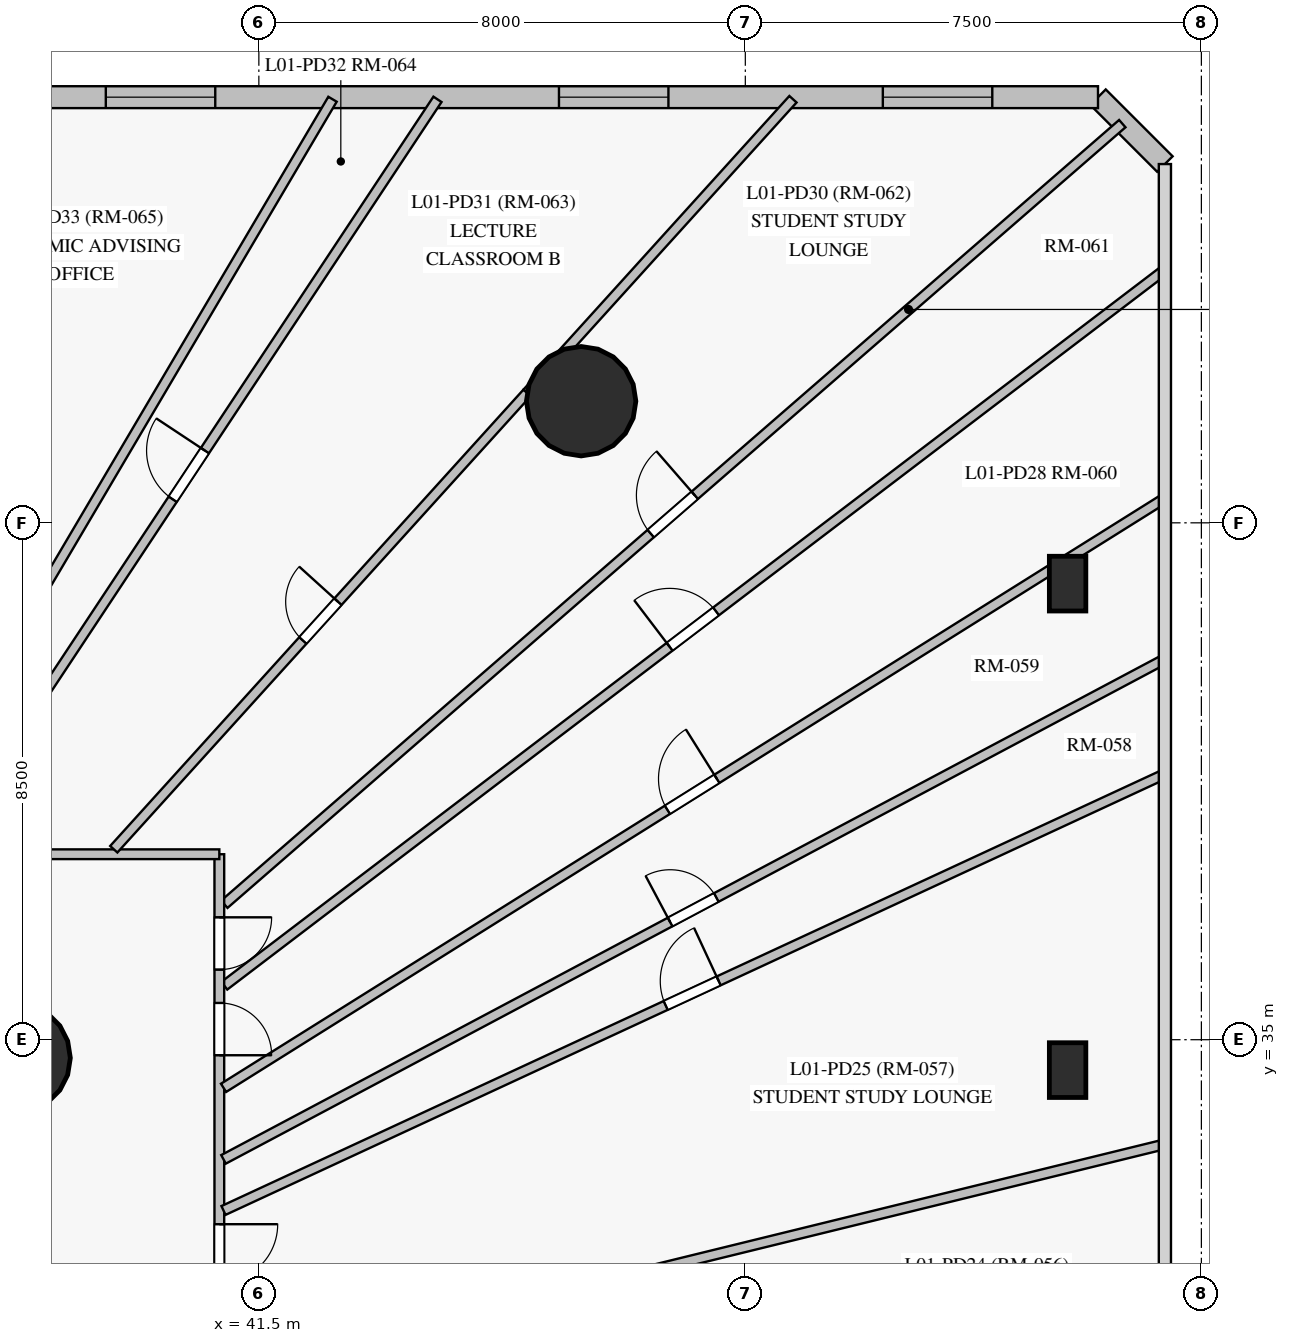
"""IFC4 building model, lengths in metres.
Left out: names, types, materials, properties, quantities, classifications, styles, units other than length and angle.
Written with IfcOpenShell. Run it as: python <this file> out.ifc"""

import sys

from ifc_helpers import new_model, si_unit, direction, frame, frame_2d, origin, origin_with_axes, origin_2d, place, context, subcontext, project, spatial, rectangle, circle, extrude, source, transform, mapped, element, fill, save


model = new_model("IFC4")
c1 = context("Model", 3, precision=1e-05, world=origin(), true_north=direction((0.0, 1.0)))
c2 = subcontext(c1, "Body", "Model", "MODEL_VIEW")
j1 = project(units=[si_unit("LENGTHUNIT", "METRE"), si_unit("PLANEANGLEUNIT", "RADIAN")], contexts=[c1])
p1 = place(None, origin())
s1 = spatial("IfcSite", under=j1, at=p1, CompositionType="ELEMENT")
p2 = place(p1, origin())
s2 = spatial("IfcBuilding", under=s1, at=p2, CompositionType="ELEMENT")
p3 = place(p2, frame((0.0, 0.0, 4.5)))
s3 = spatial("IfcBuildingStorey", under=s2, at=p3, CompositionType="ELEMENT", Elevation=4.5)
m1 = source(origin_with_axes(), c2, "Body", "SweptSolid", [
    extrude(circle(Radius=0.9, at=origin_2d()), origin(), (0.0, 0.0, 1.0), 4.5),
])
for number, where, z_axis, x_axis in (
    (1, (37.5, 34.7, 0.0), (0.0, 0.0, 1.0), (1.0, 0.0, 0.0)),
    (2, (46.8, 45.5, 0.0), (0.0, 0.0, 1.0), (1.0, 0.0, 0.0)),
):
    element("IfcColumn", number, at=place(p3, frame(where, z_axis=z_axis, x_axis=x_axis)), inside=s3, PredefinedType="COLUMN", context=c2, shape_type="MappedRepresentation", body=[
        mapped(m1, transform((0.0, 0.0, 0.0), scale=1.0)),
    ])
m2 = source(origin_with_axes(), c2, "Body", "SweptSolid", [
    extrude(rectangle(XDim=0.6, YDim=0.9, at=origin_2d()), origin(), (0.0, 0.0, 1.0), 4.5),
])
for number, where, z_axis, x_axis in (
    (3, (54.8, 34.5, 0.0), (0.0, 0.0, 1.0), (1.0, 0.0, 0.0)),
    (4, (54.8, 42.5, 0.0), (0.0, 0.0, 1.0), (1.0, 0.0, 0.0)),
):
    element("IfcColumn", number, at=place(p3, frame(where, z_axis=z_axis, x_axis=x_axis)), inside=s3, PredefinedType="PILASTER", context=c2, shape_type="MappedRepresentation", body=[
        mapped(m2, transform((0.0, 0.0, 0.0), scale=1.0)),
    ])
p4 = place(p3, frame((56.4, 49.4, 0.0), z_axis=(0.0, 0.0, 1.0), x_axis=(-0.707028305322, 0.707185248342, 0.0)))
e5 = element("IfcWall", 5, at=p4, inside=s3, PredefinedType="SOLIDWALL", context=c2, shape_type="SweptSolid", body=[
    extrude(rectangle(XDim=1.556, YDim=0.36, at=frame_2d((0.778, 0.0))), origin(), (0.0, 0.0, 1.0), 4.2),
])
p5 = place(p3, frame((55.3, 50.5, 0.0), z_axis=(0.0, 0.0, 1.0), x_axis=(-1.0, 0.0, 0.0)))
e6 = element("IfcWall", 6, at=p5, inside=s3, PredefinedType="SOLIDWALL", context=c2, shape_type="SweptSolid", body=[
    extrude(rectangle(XDim=51.85, YDim=0.36, at=frame_2d((25.925, 0.0))), origin(), (0.0, 0.0, 1.0), 4.2),
])
p6 = place(p5, frame((1.739, 0.0, 0.85)))
e7 = element("IfcOpeningElement", 7, at=p6, cuts=e6, PredefinedType="OPENING", context=c2, shape_type="SweptSolid", body=[
    extrude(rectangle(XDim=1.8, YDim=2.2, at=frame_2d((0.9, 1.1))), frame((0.0, 0.19, 0.0), z_axis=(0.0, -1.0, 0.0), x_axis=(1.0, 0.0, 0.0)), (0.0, 0.0, 1.0), 0.38),
])
p7 = place(p5, frame((7.064, 0.0, 0.85)))
e8 = element("IfcOpeningElement", 8, at=p7, cuts=e6, PredefinedType="OPENING", context=c2, shape_type="SweptSolid", body=[
    extrude(rectangle(XDim=1.8, YDim=2.2, at=frame_2d((0.9, 1.1))), frame((0.0, 0.19, 0.0), z_axis=(0.0, -1.0, 0.0), x_axis=(1.0, 0.0, 0.0)), (0.0, 0.0, 1.0), 0.38),
])
p8 = place(p5, frame((14.517, 0.0, 0.85)))
e9 = element("IfcOpeningElement", 9, at=p8, cuts=e6, PredefinedType="OPENING", context=c2, shape_type="SweptSolid", body=[
    extrude(rectangle(XDim=1.8, YDim=2.2, at=frame_2d((0.9, 1.1))), frame((0.0, 0.19, 0.0), z_axis=(0.0, -1.0, 0.0), x_axis=(1.0, 0.0, 0.0)), (0.0, 0.0, 1.0), 0.38),
])
p9 = place(p5, frame((19.389, 0.0, 0.85)))
e10 = element("IfcOpeningElement", 10, at=p9, cuts=e6, PredefinedType="OPENING", context=c2, shape_type="SweptSolid", body=[
    extrude(rectangle(XDim=1.8, YDim=2.2, at=frame_2d((0.9, 1.1))), frame((0.0, 0.19, 0.0), z_axis=(0.0, -1.0, 0.0), x_axis=(1.0, 0.0, 0.0)), (0.0, 0.0, 1.0), 0.38),
])
p10 = place(p5, frame((23.507, 0.0, 0.85)))
e11 = element("IfcOpeningElement", 11, at=p10, cuts=e6, PredefinedType="OPENING", context=c2, shape_type="SweptSolid", body=[
    extrude(rectangle(XDim=1.8, YDim=2.2, at=frame_2d((0.9, 1.1))), frame((0.0, 0.19, 0.0), z_axis=(0.0, -1.0, 0.0), x_axis=(1.0, 0.0, 0.0)), (0.0, 0.0, 1.0), 0.38),
])
p11 = place(p5, frame((27.282, 0.0, 0.85)))
e12 = element("IfcOpeningElement", 12, at=p11, cuts=e6, PredefinedType="OPENING", context=c2, shape_type="SweptSolid", body=[
    extrude(rectangle(XDim=1.8, YDim=2.2, at=frame_2d((0.9, 1.1))), frame((0.0, 0.19, 0.0), z_axis=(0.0, -1.0, 0.0), x_axis=(1.0, 0.0, 0.0)), (0.0, 0.0, 1.0), 0.38),
])
p12 = place(p5, frame((31.1, 0.0, 0.85)))
e13 = element("IfcOpeningElement", 13, at=p12, cuts=e6, PredefinedType="OPENING", context=c2, shape_type="SweptSolid", body=[
    extrude(rectangle(XDim=1.8, YDim=2.2, at=frame_2d((0.9, 1.1))), frame((0.0, 0.19, 0.0), z_axis=(0.0, -1.0, 0.0), x_axis=(1.0, 0.0, 0.0)), (0.0, 0.0, 1.0), 0.38),
])
p13 = place(p5, frame((35.392, 0.0, 0.85)))
e14 = element("IfcOpeningElement", 14, at=p13, cuts=e6, PredefinedType="OPENING", context=c2, shape_type="SweptSolid", body=[
    extrude(rectangle(XDim=1.8, YDim=2.2, at=frame_2d((0.9, 1.1))), frame((0.0, 0.19, 0.0), z_axis=(0.0, -1.0, 0.0), x_axis=(1.0, 0.0, 0.0)), (0.0, 0.0, 1.0), 0.38),
])
p14 = place(p5, frame((42.797, 0.0, 0.85)))
e15 = element("IfcOpeningElement", 15, at=p14, cuts=e6, PredefinedType="OPENING", context=c2, shape_type="SweptSolid", body=[
    extrude(rectangle(XDim=1.8, YDim=2.2, at=frame_2d((0.9, 1.1))), frame((0.0, 0.19, 0.0), z_axis=(0.0, -1.0, 0.0), x_axis=(1.0, 0.0, 0.0)), (0.0, 0.0, 1.0), 0.38),
])
p15 = place(p5, frame((47.865, 0.0, 0.85)))
e16 = element("IfcOpeningElement", 16, at=p15, cuts=e6, PredefinedType="OPENING", context=c2, shape_type="SweptSolid", body=[
    extrude(rectangle(XDim=1.8, YDim=2.2, at=frame_2d((0.9, 1.1))), frame((0.0, 0.19, 0.0), z_axis=(0.0, -1.0, 0.0), x_axis=(1.0, 0.0, 0.0)), (0.0, 0.0, 1.0), 0.38),
])
p16 = place(p3, frame((40.932, 37.227, 0.0), z_axis=(0.0, 0.0, 1.0), x_axis=(0.754711343855, 0.656057000158, 0.0)))
e17 = element("IfcWall", 17, at=p16, inside=s3, PredefinedType="PARTITIONING", context=c2, shape_type="SweptSolid", body=[
    extrude(rectangle(XDim=19.568, YDim=0.16, at=frame_2d((9.784, 0.0))), origin(), (0.0, 0.0, 1.0), 4.2),
])
p17 = place(p16, frame((9.291, 0.0, 0.0)))
e18 = element("IfcOpeningElement", 18, at=p17, cuts=e17, PredefinedType="OPENING", context=c2, shape_type="SweptSolid", body=[
    extrude(rectangle(XDim=0.96, YDim=2.15, at=frame_2d((0.48, 1.075))), frame((0.0, 0.09, 0.0), z_axis=(0.0, -1.0, 0.0), x_axis=(1.0, 0.0, 0.0)), (0.0, 0.0, 1.0), 0.18),
])
p18 = place(p3, frame((40.932, 35.888, 0.0), z_axis=(0.0, 0.0, 1.0), x_axis=(0.795705622, 0.605683550311, 0.0)))
e19 = element("IfcWall", 19, at=p18, inside=s3, PredefinedType="PARTITIONING", context=c2, shape_type="SweptSolid", body=[
    extrude(rectangle(XDim=19.392, YDim=0.16, at=frame_2d((9.696, 0.0))), origin(), (0.0, 0.0, 1.0), 4.2),
])
p19 = place(p18, frame((9.203, 0.0, 0.0)))
e20 = element("IfcOpeningElement", 20, at=p19, cuts=e19, PredefinedType="OPENING", context=c2, shape_type="SweptSolid", body=[
    extrude(rectangle(XDim=0.96, YDim=2.15, at=frame_2d((0.48, 1.075))), frame((0.0, 0.09, 0.0), z_axis=(0.0, -1.0, 0.0), x_axis=(1.0, 0.0, 0.0)), (0.0, 0.0, 1.0), 0.18),
])
p20 = place(p3, frame((40.85, 38.05, 0.0), z_axis=(0.0, 0.0, 1.0), x_axis=(0.0, -1.0, 0.0)))
e21 = element("IfcWall", 21, at=p20, inside=s3, PredefinedType="PARTITIONING", context=c2, shape_type="SweptSolid", body=[
    extrude(rectangle(XDim=18.508, YDim=0.16, at=frame_2d((9.254, 0.0))), origin(), (0.0, 0.0, 1.0), 3.25),
])
p21 = place(p20, frame((13.28, 0.0, 0.0)))
e22 = element("IfcOpeningElement", 22, at=p21, cuts=e21, PredefinedType="OPENING", context=c2, shape_type="SweptSolid", body=[
    extrude(rectangle(XDim=0.96, YDim=2.15, at=frame_2d((0.48, 1.075))), frame((0.0, 0.09, 0.0), z_axis=(0.0, -1.0, 0.0), x_axis=(1.0, 0.0, 0.0)), (0.0, 0.0, 1.0), 0.18),
])
p22 = place(p20, frame((11.636, 0.0, 0.0)))
e23 = element("IfcOpeningElement", 23, at=p22, cuts=e21, PredefinedType="OPENING", context=c2, shape_type="SweptSolid", body=[
    extrude(rectangle(XDim=0.96, YDim=2.15, at=frame_2d((0.48, 1.075))), frame((0.0, 0.09, 0.0), z_axis=(0.0, -1.0, 0.0), x_axis=(1.0, 0.0, 0.0)), (0.0, 0.0, 1.0), 0.18),
])
p23 = place(p20, frame((8.835, 0.0, 0.0)))
e24 = element("IfcOpeningElement", 24, at=p23, cuts=e21, PredefinedType="OPENING", context=c2, shape_type="SweptSolid", body=[
    extrude(rectangle(XDim=0.96, YDim=2.15, at=frame_2d((0.48, 1.075))), frame((0.0, 0.09, 0.0), z_axis=(0.0, -1.0, 0.0), x_axis=(1.0, 0.0, 0.0)), (0.0, 0.0, 1.0), 0.18),
])
p24 = place(p20, frame((6.084, 0.0, 0.0)))
e25 = element("IfcOpeningElement", 25, at=p24, cuts=e21, PredefinedType="OPENING", context=c2, shape_type="SweptSolid", body=[
    extrude(rectangle(XDim=0.96, YDim=2.15, at=frame_2d((0.48, 1.075))), frame((0.0, 0.09, 0.0), z_axis=(0.0, -1.0, 0.0), x_axis=(1.0, 0.0, 0.0)), (0.0, 0.0, 1.0), 0.18),
])
p25 = place(p20, frame((7.2, 0.0, 0.0)))
e26 = element("IfcOpeningElement", 26, at=p25, cuts=e21, PredefinedType="OPENING", context=c2, shape_type="SweptSolid", body=[
    extrude(rectangle(XDim=0.96, YDim=2.15, at=frame_2d((0.48, 1.075))), frame((0.0, 0.09, 0.0), z_axis=(0.0, -1.0, 0.0), x_axis=(1.0, 0.0, 0.0)), (0.0, 0.0, 1.0), 0.18),
])
p26 = place(p20, frame((2.446, 0.0, 0.0)))
e27 = element("IfcOpeningElement", 27, at=p26, cuts=e21, PredefinedType="OPENING", context=c2, shape_type="SweptSolid", body=[
    extrude(rectangle(XDim=0.86, YDim=2.04, at=frame_2d((0.43, 1.02))), frame((0.0, 0.09, 0.0), z_axis=(0.0, -1.0, 0.0), x_axis=(1.0, 0.0, 0.0)), (0.0, 0.0, 1.0), 0.18),
])
p27 = place(p20, frame((1.037, 0.0, 0.0)))
e28 = element("IfcOpeningElement", 28, at=p27, cuts=e21, PredefinedType="OPENING", context=c2, shape_type="SweptSolid", body=[
    extrude(rectangle(XDim=0.86, YDim=2.04, at=frame_2d((0.43, 1.02))), frame((0.0, 0.09, 0.0), z_axis=(0.0, -1.0, 0.0), x_axis=(1.0, 0.0, 0.0)), (0.0, 0.0, 1.0), 0.18),
])
p28 = place(p3, frame((40.919, 34.208, 0.0), z_axis=(0.0, 0.0, 1.0), x_axis=(0.847469594602, 0.530843937731, 0.0)))
e29 = element("IfcWall", 29, at=p28, inside=s3, PredefinedType="PARTITIONING", context=c2, shape_type="SweptSolid", body=[
    extrude(rectangle(XDim=18.226, YDim=0.16, at=frame_2d((9.113, 0.0))), origin(), (0.0, 0.0, 1.0), 4.2),
])
p29 = place(p28, frame((8.613, 0.0, 0.0)))
e30 = element("IfcOpeningElement", 30, at=p29, cuts=e29, PredefinedType="OPENING", context=c2, shape_type="SweptSolid", body=[
    extrude(rectangle(XDim=0.96, YDim=2.15, at=frame_2d((0.48, 1.075))), frame((0.0, 0.09, 0.0), z_axis=(0.0, -1.0, 0.0), x_axis=(1.0, 0.0, 0.0)), (0.0, 0.0, 1.0), 0.18),
])
p30 = place(p3, frame((40.919, 33.032, 0.0), z_axis=(0.0, 0.0, 1.0), x_axis=(0.883043074969, 0.469291942984, 0.0)))
e31 = element("IfcWall", 31, at=p30, inside=s3, PredefinedType="PARTITIONING", context=c2, shape_type="SweptSolid", body=[
    extrude(rectangle(XDim=17.495, YDim=0.16, at=frame_2d((8.748, 0.0))), origin(), (0.0, 0.0, 1.0), 4.2),
])
p31 = place(p30, frame((8.317, 0.0, 0.0)))
e32 = element("IfcOpeningElement", 32, at=p31, cuts=e31, PredefinedType="OPENING", context=c2, shape_type="SweptSolid", body=[
    extrude(rectangle(XDim=0.86, YDim=2.04, at=frame_2d((0.43, 1.02))), frame((0.0, 0.09, 0.0), z_axis=(0.0, -1.0, 0.0), x_axis=(1.0, 0.0, 0.0)), (0.0, 0.0, 1.0), 0.18),
])
p32 = place(p3, frame((40.918, 32.192, 0.0), z_axis=(0.0, 0.0, 1.0), x_axis=(0.907224152949, 0.420647520265, 0.0)))
e33 = element("IfcWall", 33, at=p32, inside=s3, PredefinedType="PARTITIONING", context=c2, shape_type="SweptSolid", body=[
    extrude(rectangle(XDim=17.031, YDim=0.16, at=frame_2d((8.515, 0.0))), origin(), (0.0, 0.0, 1.0), 4.2),
])
p33 = place(p32, frame((8.015, 0.0, 0.0)))
e34 = element("IfcOpeningElement", 34, at=p33, cuts=e33, PredefinedType="OPENING", context=c2, shape_type="SweptSolid", body=[
    extrude(rectangle(XDim=0.96, YDim=2.15, at=frame_2d((0.48, 1.075))), frame((0.0, 0.09, 0.0), z_axis=(0.0, -1.0, 0.0), x_axis=(1.0, 0.0, 0.0)), (0.0, 0.0, 1.0), 0.18),
])
p34 = place(p3, frame((40.917, 29.484, 0.0), z_axis=(0.0, 0.0, 1.0), x_axis=(0.97121044227, 0.238223166012, 0.0)))
e35 = element("IfcWall", 35, at=p34, inside=s3, PredefinedType="PARTITIONING", context=c2, shape_type="SweptSolid", body=[
    extrude(rectangle(XDim=15.914, YDim=0.16, at=frame_2d((7.957, 0.0))), origin(), (0.0, 0.0, 1.0), 3.7),
])
p35 = place(p3, frame((25.4, 38.05, 0.0), z_axis=(0.0, 0.0, 1.0), x_axis=(1.0, 0.0, 0.0)))
e36 = element("IfcWall", 36, at=p35, inside=s3, PredefinedType="PARTITIONING", context=c2, shape_type="SweptSolid", body=[
    extrude(rectangle(XDim=15.45, YDim=0.16, at=frame_2d((7.725, 0.0))), origin(), (0.0, 0.0, 1.0), 4.2),
])
p36 = place(p35, frame((11.452, 0.0, 0.0)))
e37 = element("IfcOpeningElement", 37, at=p36, cuts=e36, PredefinedType="OPENING", context=c2, shape_type="SweptSolid", body=[
    extrude(rectangle(XDim=0.96, YDim=2.15, at=frame_2d((0.48, 1.075))), frame((0.0, 0.09, 0.0), z_axis=(0.0, -1.0, 0.0), x_axis=(1.0, 0.0, 0.0)), (0.0, 0.0, 1.0), 0.18),
])
p37 = place(p35, frame((7.59, 0.0, 0.0)))
e38 = element("IfcOpeningElement", 38, at=p37, cuts=e36, PredefinedType="OPENING", context=c2, shape_type="SweptSolid", body=[
    extrude(rectangle(XDim=0.96, YDim=2.15, at=frame_2d((0.48, 1.075))), frame((0.0, 0.09, 0.0), z_axis=(0.0, -1.0, 0.0), x_axis=(1.0, 0.0, 0.0)), (0.0, 0.0, 1.0), 0.18),
])
p38 = place(p35, frame((5.573, 0.0, 0.0)))
e39 = element("IfcOpeningElement", 39, at=p38, cuts=e36, PredefinedType="OPENING", context=c2, shape_type="SweptSolid", body=[
    extrude(rectangle(XDim=0.96, YDim=2.15, at=frame_2d((0.48, 1.075))), frame((0.0, 0.09, 0.0), z_axis=(0.0, -1.0, 0.0), x_axis=(1.0, 0.0, 0.0)), (0.0, 0.0, 1.0), 0.18),
])
p39 = place(p35, frame((3.528, 0.0, 0.0)))
e40 = element("IfcOpeningElement", 40, at=p39, cuts=e36, PredefinedType="OPENING", context=c2, shape_type="SweptSolid", body=[
    extrude(rectangle(XDim=0.96, YDim=2.15, at=frame_2d((0.48, 1.075))), frame((0.0, 0.09, 0.0), z_axis=(0.0, -1.0, 0.0), x_axis=(1.0, 0.0, 0.0)), (0.0, 0.0, 1.0), 0.18),
])
p40 = place(p3, frame((36.273, 38.132, 0.0), z_axis=(0.0, 0.0, 1.0), x_axis=(0.552038412562, 0.833818679963, 0.0)))
e41 = element("IfcWall", 41, at=p40, inside=s3, PredefinedType="PARTITIONING", context=c2, shape_type="SweptSolid", body=[
    extrude(rectangle(XDim=14.79, YDim=0.16, at=frame_2d((7.395, 0.0))), origin(), (0.0, 0.0, 1.0), 4.2),
])
p41 = place(p40, frame((6.903, 0.0, 0.0)))
e42 = element("IfcOpeningElement", 42, at=p41, cuts=e41, PredefinedType="OPENING", context=c2, shape_type="SweptSolid", body=[
    extrude(rectangle(XDim=0.96, YDim=2.15, at=frame_2d((0.48, 1.075))), frame((0.0, 0.09, 0.0), z_axis=(0.0, -1.0, 0.0), x_axis=(1.0, 0.0, 0.0)), (0.0, 0.0, 1.0), 0.18),
])
p42 = place(p3, frame((35.426, 38.119, 0.0), z_axis=(0.0, 0.0, 1.0), x_axis=(0.508185874547, 0.861247419103, 0.0)))
e43 = element("IfcWall", 43, at=p42, inside=s3, PredefinedType="PARTITIONING", context=c2, shape_type="SweptSolid", body=[
    extrude(rectangle(XDim=14.336, YDim=0.16, at=frame_2d((7.168, 0.0))), origin(), (0.0, 0.0, 1.0), 4.2),
])
p43 = place(p3, frame((39.114, 38.132, 0.0), z_axis=(0.0, 0.0, 1.0), x_axis=(0.671237186901, 0.741242631613, 0.0)))
e44 = element("IfcWall", 44, at=p43, inside=s3, PredefinedType="PARTITIONING", context=c2, shape_type="SweptSolid", body=[
    extrude(rectangle(XDim=10.124, YDim=0.16, at=frame_2d((5.062, 0.0))), origin(), (0.0, 0.0, 1.0), 4.2),
])
p44 = place(p43, frame((4.632, 0.0, 0.0)))
e45 = element("IfcOpeningElement", 45, at=p44, cuts=e44, PredefinedType="OPENING", context=c2, shape_type="SweptSolid", body=[
    extrude(rectangle(XDim=0.86, YDim=2.04, at=frame_2d((0.43, 1.02))), frame((0.0, 0.09, 0.0), z_axis=(0.0, -1.0, 0.0), x_axis=(1.0, 0.0, 0.0)), (0.0, 0.0, 1.0), 0.18),
])
p45 = place(p3, frame((45.913, 45.64, 0.0), z_axis=(0.0, 0.0, 1.0), x_axis=(0.671236287412, 0.741243446151, 0.0)))
e46 = element("IfcWall", 46, at=p45, inside=s3, PredefinedType="PARTITIONING", context=c2, shape_type="SweptSolid", body=[
    extrude(rectangle(XDim=6.511, YDim=0.16, at=frame_2d((3.255, 0.0))), origin(), (0.0, 0.0, 1.0), 4.2),
])
m3 = source(origin_with_axes(), c2, "Body", "SweptSolid", [
    extrude(rectangle(XDim=1.8, YDim=2.2, at=frame_2d((0.9, 1.1))), frame((0.0, 0.03, 0.0), z_axis=(0.0, -1.0, 0.0), x_axis=(1.0, 0.0, 0.0)), (0.0, 0.0, 1.0), 0.06),
])
p46 = place(p6, origin())
e47 = element("IfcWindow", 47, at=p46, inside=s3, PartitioningType="SINGLE_PANEL", PredefinedType="WINDOW", context=c2, shape_type="MappedRepresentation", body=[
    mapped(m3, transform((0.0, 0.0, 0.0), scale=1.0)),
])
fill(e7, e47)
p47 = place(p7, origin())
e48 = element("IfcWindow", 48, at=p47, inside=s3, PartitioningType="SINGLE_PANEL", PredefinedType="WINDOW", context=c2, shape_type="MappedRepresentation", body=[
    mapped(m3, transform((0.0, 0.0, 0.0), scale=1.0)),
])
fill(e8, e48)
p48 = place(p8, origin())
e49 = element("IfcWindow", 49, at=p48, inside=s3, PartitioningType="SINGLE_PANEL", PredefinedType="WINDOW", context=c2, shape_type="MappedRepresentation", body=[
    mapped(m3, transform((0.0, 0.0, 0.0), scale=1.0)),
])
fill(e9, e49)
m4 = source(origin_with_axes(), c2, "Body", "SweptSolid", [
    extrude(rectangle(XDim=0.96, YDim=2.15, at=frame_2d((0.48, 1.075))), frame((0.0, 0.025, 0.0), z_axis=(0.0, -1.0, 0.0), x_axis=(1.0, 0.0, 0.0)), (0.0, 0.0, 1.0), 0.05),
])
p49 = place(p24, origin())
e50 = element("IfcDoor", 50, at=p49, inside=s3, OperationType="SINGLE_SWING_LEFT", PredefinedType="DOOR", context=c2, shape_type="MappedRepresentation", body=[
    mapped(m4, transform((0.0, 0.0, 0.0), scale=1.0)),
])
fill(e25, e50)
p50 = place(p33, origin())
e51 = element("IfcDoor", 51, at=p50, inside=s3, OperationType="SINGLE_SWING_RIGHT", PredefinedType="DOOR", context=c2, shape_type="MappedRepresentation", body=[
    mapped(m4, transform((0.0, 0.0, 0.0), scale=1.0)),
])
fill(e34, e51)
p51 = place(p29, origin())
e52 = element("IfcDoor", 52, at=p51, inside=s3, OperationType="SINGLE_SWING_RIGHT", PredefinedType="DOOR", context=c2, shape_type="MappedRepresentation", body=[
    mapped(m4, transform((0.0, 0.0, 0.0), scale=1.0)),
])
fill(e30, e52)
p52 = place(p19, origin())
e53 = element("IfcDoor", 53, at=p52, inside=s3, OperationType="SINGLE_SWING_LEFT", PredefinedType="DOOR", context=c2, shape_type="MappedRepresentation", body=[
    mapped(m4, transform((0.0, 0.0, 0.0), scale=1.0)),
])
fill(e20, e53)
p53 = place(p17, origin())
e54 = element("IfcDoor", 54, at=p53, inside=s3, OperationType="SINGLE_SWING_RIGHT", PredefinedType="DOOR", context=c2, shape_type="MappedRepresentation", body=[
    mapped(m4, transform((0.0, 0.0, 0.0), scale=1.0)),
])
fill(e18, e54)
p54 = place(p41, origin())
e55 = element("IfcDoor", 55, at=p54, inside=s3, OperationType="SINGLE_SWING_RIGHT", PredefinedType="DOOR", context=c2, shape_type="MappedRepresentation", body=[
    mapped(m4, transform((0.0, 0.0, 0.0), scale=1.0)),
])
fill(e42, e55)
m5 = source(origin_with_axes(), c2, "Body", "SweptSolid", [
    extrude(rectangle(XDim=0.86, YDim=2.04, at=frame_2d((0.43, 1.02))), frame((0.0, 0.025, 0.0), z_axis=(0.0, -1.0, 0.0), x_axis=(1.0, 0.0, 0.0)), (0.0, 0.0, 1.0), 0.05),
])
p55 = place(p31, origin())
e56 = element("IfcDoor", 56, at=p55, inside=s3, OperationType="SINGLE_SWING_LEFT", PredefinedType="DOOR", context=c2, shape_type="MappedRepresentation", body=[
    mapped(m5, transform((0.0, 0.0, 0.0), scale=1.0)),
])
fill(e32, e56)
p56 = place(p26, origin())
e57 = element("IfcDoor", 57, at=p56, inside=s3, OperationType="SINGLE_SWING_RIGHT", PredefinedType="DOOR", context=c2, shape_type="MappedRepresentation", body=[
    mapped(m5, transform((0.0, 0.0, 0.0), scale=1.0)),
])
fill(e27, e57)
p57 = place(p27, origin())
e58 = element("IfcDoor", 58, at=p57, inside=s3, OperationType="SINGLE_SWING_LEFT", PredefinedType="DOOR", context=c2, shape_type="MappedRepresentation", body=[
    mapped(m5, transform((0.0, 0.0, 0.0), scale=1.0)),
])
fill(e28, e58)
p58 = place(p44, origin())
e59 = element("IfcDoor", 59, at=p58, inside=s3, OperationType="SINGLE_SWING_RIGHT", PredefinedType="DOOR", context=c2, shape_type="MappedRepresentation", body=[
    mapped(m5, transform((0.0, 0.0, 0.0), scale=1.0)),
])
fill(e45, e59)
save(model, sys.argv[1])
